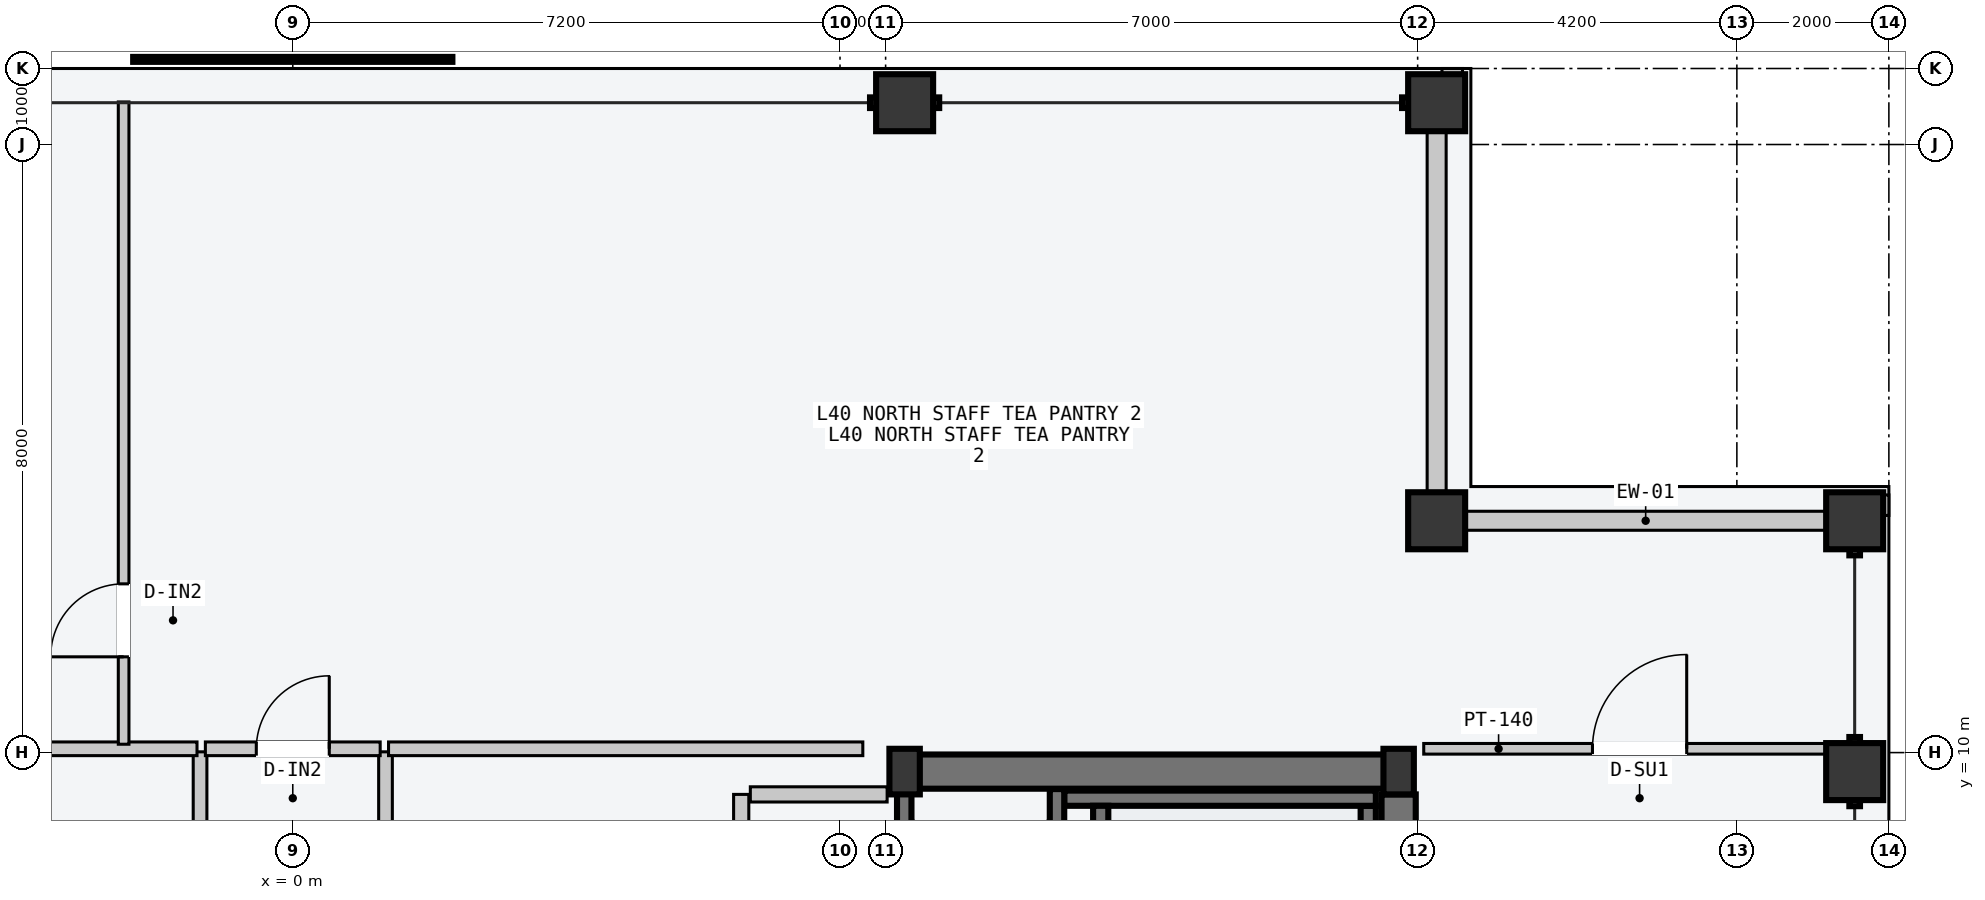
"""IFC4 building model, lengths in metres.
Left out: names, types, materials, properties, quantities, classifications, styles, units other than length and angle.
Written with IfcOpenShell. Run it as: python <this file> out.ifc"""

import sys

from ifc_helpers import new_model, si_unit, direction, frame, frame_2d, origin, origin_2d, place, context, subcontext, project, spatial, rectangle, hollow_rectangle, i_section, extrude, element, fill, save


model = new_model("IFC4")
c1 = context("Model", 3, precision=1e-05, world=origin(), true_north=direction((0.0, 1.0)))
c2 = subcontext(c1, "Body", "Model", "MODEL_VIEW")
j1 = project(units=[si_unit("LENGTHUNIT", "METRE"), si_unit("PLANEANGLEUNIT", "RADIAN")], contexts=[c1])
p1 = place(None, origin())
s1 = spatial("IfcSite", under=j1, at=p1, CompositionType="ELEMENT")
p2 = place(p1, origin())
s2 = spatial("IfcBuilding", under=s1, at=p2, CompositionType="ELEMENT")
p3 = place(p2, frame((0.0, 0.0, 155.1)))
s3 = spatial("IfcBuildingStorey", under=s2, at=p3, CompositionType="ELEMENT", Elevation=155.1)
p4 = place(p3, frame((8.07, 9.75, -0.2), z_axis=(0.0, 0.0, 1.0), x_axis=(1.0, 0.0, 0.0)))
e1 = element("IfcWall", 1, at=p4, inside=s3, PredefinedType="SHEAR", context=c2, shape_type="SweptSolid", body=[
    extrude(rectangle(XDim=6.46, YDim=0.45, at=frame_2d((3.23, 0.0))), origin(), (0.0, 0.0, 1.0), 3.6),
])
p5 = place(p3, frame((14.55, 0.3, -0.2), z_axis=(0.0, 0.0, 1.0), x_axis=(0.0, 1.0, 0.0)))
e2 = element("IfcWall", 2, at=p5, inside=s3, PredefinedType="SHEAR", context=c2, shape_type="SweptSolid", body=[
    extrude(rectangle(XDim=9.15, YDim=0.45, at=frame_2d((4.575, 0.0))), origin(), (0.0, 0.0, 1.0), 3.6),
])
p6 = place(p3, frame((14.15, 1.5, -0.2), z_axis=(0.0, 0.0, 1.0), x_axis=(0.0, 1.0, 0.0)))
e3 = element("IfcWall", 3, at=p6, inside=s3, PredefinedType="SOLIDWALL", context=c2, shape_type="SweptSolid", body=[
    extrude(rectangle(XDim=7.8, YDim=0.2, at=frame_2d((3.9, 0.0))), origin(), (0.0, 0.0, 1.0), 3.6),
])
p7 = place(p3, frame((10.15, 9.4, -0.2), z_axis=(0.0, 0.0, 1.0), x_axis=(1.0, 0.0, 0.0)))
e4 = element("IfcWall", 4, at=p7, inside=s3, PredefinedType="SOLIDWALL", context=c2, shape_type="SweptSolid", body=[
    extrude(rectangle(XDim=4.1, YDim=0.2, at=frame_2d((2.05, 0.0))), origin(), (0.0, 0.0, 1.0), 3.6),
])
p8 = place(p3, frame((10.63, 1.5, -0.2), z_axis=(0.0, 0.0, 1.0), x_axis=(0.0, 1.0, 0.0)))
e5 = element("IfcWall", 5, at=p8, inside=s3, PredefinedType="SOLIDWALL", context=c2, shape_type="SweptSolid", body=[
    extrude(rectangle(XDim=7.8, YDim=0.2, at=frame_2d((3.9, 0.0))), origin(), (0.0, 0.0, 1.0), 3.6),
])
for number, where, z_axis, x_axis in (
    (6, (8.05, 9.75, 0.0), (0.0, 0.0, 1.0), (1.0, 0.0, 0.0)),
    (7, (14.55, 9.75, 0.0), (0.0, 0.0, 1.0), (1.0, 0.0, 0.0)),
):
    element("IfcColumn", number, at=place(p3, frame(where, z_axis=z_axis, x_axis=x_axis)), inside=s3, PredefinedType="COLUMN", context=c2, shape_type="SweptSolid", body=[
        extrude(i_section(OverallWidth=0.4, OverallDepth=0.6, WebThickness=0.022, FlangeThickness=0.036, at=origin_2d()), origin(), (0.0, 0.0, 1.0), 3.6),
    ])
for number, where, z_axis, x_axis in (
    (8, (8.05, 18.55, 0.0), (0.0, 0.0, 1.0), (1.0, 0.0, 0.0)),
    (9, (15.05, 18.55, 0.0), (0.0, 0.0, 1.0), (1.0, 0.0, 0.0)),
    (10, (20.55, 9.75, 0.0), (0.0, 0.0, 1.0), (0.0, 1.0, 0.0)),
    (11, (20.55, 13.05, 0.0), (0.0, 0.0, 1.0), (0.0, 1.0, 0.0)),
    (12, (15.05, 13.05, 0.0), (0.0, 0.0, 1.0), (1.0, 0.0, 0.0)),
):
    element("IfcColumn", number, at=place(p3, frame(where, z_axis=z_axis, x_axis=x_axis)), inside=s3, PredefinedType="COLUMN", context=c2, shape_type="SweptSolid", body=[
        extrude(hollow_rectangle(XDim=0.75, YDim=0.75, WallThickness=0.032, at=origin_2d()), origin(), (0.0, 0.0, 1.0), 3.6),
    ])
for number, where, z_axis, x_axis in (
    (13, (15.435, 13.05, 0.0), (0.0, 0.0, 1.0), (1.0, 0.0, 0.0)),
    (14, (15.05, 13.435, 0.0), (0.0, 0.0, 1.0), (0.0, 1.0, 0.0)),
):
    element("IfcWall", number, at=place(p3, frame(where, z_axis=z_axis, x_axis=x_axis)), inside=s3, PredefinedType="STANDARD", context=c2, shape_type="SweptSolid", body=[
        extrude(rectangle(XDim=4.73, YDim=0.25, at=frame_2d((2.365, 0.0))), origin(), (0.0, 0.0, 1.0), 2.75),
    ])
for number, where, z_axis, x_axis in (
    (15, (15.12, 18.89, 0.0), (0.0, 0.0, 1.0), (1.0, 0.0, 0.0)),
    (16, (20.89, 13.12, 0.0), (0.0, 0.0, 1.0), (0.0, 1.0, 0.0)),
):
    element("IfcWall", number, at=place(p3, frame(where, z_axis=z_axis, x_axis=x_axis)), inside=s3, PredefinedType="PARAPET", context=c2, shape_type="SweptSolid", body=[
        extrude(rectangle(XDim=0.27, YDim=0.22, at=frame_2d((0.135, 0.0))), origin(), (0.0, 0.0, 1.0), 1.2),
    ])
for number, where, z_axis, x_axis in (
    (17, (8.045, 7.15, -0.2), (0.0, 0.0, 1.0), (0.0, 1.0, 0.0)),
    (18, (10.055, 7.15, -0.2), (0.0, 0.0, 1.0), (0.0, 1.0, 0.0)),
):
    element("IfcWall", number, at=place(p3, frame(where, z_axis=z_axis, x_axis=x_axis)), inside=s3, PredefinedType="SOLIDWALL", context=c2, shape_type="SweptSolid", body=[
        extrude(rectangle(XDim=2.37, YDim=0.19, at=frame_2d((1.185, 0.0))), origin(), (0.0, 0.0, 1.0), 3.6),
    ])
p9 = place(p3, frame((5.9, -9.45, 0.0), z_axis=(0.0, 0.0, 1.0), x_axis=(0.0, 1.0, 0.0)))
e19 = element("IfcWall", 19, at=p9, inside=s3, PredefinedType="PARTITIONING", context=c2, shape_type="SweptSolid", body=[
    extrude(rectangle(XDim=18.9, YDim=0.2, at=frame_2d((9.45, 0.0))), origin(), (0.0, 0.0, 1.0), 3.4),
])
p10 = place(p9, frame((3.9, 0.0, 0.0)))
e20 = element("IfcOpeningElement", 20, at=p10, cuts=e19, PredefinedType="OPENING", context=c2, shape_type="SweptSolid", body=[
    extrude(rectangle(XDim=1.5, YDim=2.2, at=frame_2d((0.75, 1.1))), frame((0.0, 0.11, 0.0), z_axis=(0.0, -1.0, 0.0), x_axis=(1.0, 0.0, 0.0)), (0.0, 0.0, 1.0), 0.22),
])
p11 = place(p3, frame((6.02, 9.45, 0.0), z_axis=(0.0, 0.0, 1.0), x_axis=(1.0, 0.0, 0.0)))
e21 = element("IfcWall", 21, at=p11, inside=s3, PredefinedType="PARTITIONING", context=c2, shape_type="SweptSolid", body=[
    extrude(rectangle(XDim=1.8, YDim=0.2, at=frame_2d((0.9, 0.0))), origin(), (0.0, 0.0, 1.0), 3.4),
])
p12 = place(p3, frame((-1.22, -3.5, 0.0), z_axis=(0.0, 0.0, 1.0), x_axis=(0.0, 1.0, 0.0)))
e22 = element("IfcWall", 22, at=p12, inside=s3, PredefinedType="PARTITIONING", context=c2, shape_type="SweptSolid", body=[
    extrude(rectangle(XDim=13.51, YDim=0.18, at=frame_2d((6.755, 0.0))), origin(), (0.0, 0.0, 1.0), 3.4),
])
p13 = place(p12, frame((6.1, 0.0, 0.0)))
e23 = element("IfcOpeningElement", 23, at=p13, cuts=e22, PredefinedType="OPENING", context=c2, shape_type="SweptSolid", body=[
    extrude(rectangle(XDim=1.24, YDim=2.24, at=frame_2d((0.62, 1.12))), frame((0.0, 0.1, 0.0), z_axis=(0.0, -1.0, 0.0), x_axis=(1.0, 0.0, 0.0)), (0.0, 0.0, 1.0), 0.2),
])
p14 = place(p12, frame((1.6, 0.0, 0.0)))
e24 = element("IfcOpeningElement", 24, at=p14, cuts=e22, PredefinedType="OPENING", context=c2, shape_type="SweptSolid", body=[
    extrude(rectangle(XDim=0.96, YDim=2.18, at=frame_2d((0.48, 1.09))), frame((0.0, 0.1, 0.0), z_axis=(0.0, -1.0, 0.0), x_axis=(1.0, 0.0, 0.0)), (0.0, 0.0, 1.0), 0.2),
])
p15 = place(p3, frame((-7.5, 10.05, 0.0), z_axis=(0.0, 0.0, 1.0), x_axis=(1.0, 0.0, 0.0)))
e25 = element("IfcWall", 25, at=p15, inside=s3, PredefinedType="PARTITIONING", context=c2, shape_type="SweptSolid", body=[
    extrude(rectangle(XDim=6.24, YDim=0.18, at=frame_2d((3.12, 0.0))), origin(), (0.0, 0.0, 1.0), 3.4),
])
p16 = place(p3, frame((1.22, -3.5, 0.0), z_axis=(0.0, 0.0, 1.0), x_axis=(0.0, 1.0, 0.0)))
e26 = element("IfcWall", 26, at=p16, inside=s3, PredefinedType="PARTITIONING", context=c2, shape_type="SweptSolid", body=[
    extrude(rectangle(XDim=13.51, YDim=0.18, at=frame_2d((6.755, 0.0))), origin(), (0.0, 0.0, 1.0), 3.4),
])
p17 = place(p16, frame((6.1, 0.0, 0.0)))
e27 = element("IfcOpeningElement", 27, at=p17, cuts=e26, PredefinedType="OPENING", context=c2, shape_type="SweptSolid", body=[
    extrude(rectangle(XDim=1.24, YDim=2.24, at=frame_2d((0.62, 1.12))), frame((0.0, 0.1, 0.0), z_axis=(0.0, -1.0, 0.0), x_axis=(1.0, 0.0, 0.0)), (0.0, 0.0, 1.0), 0.2),
])
p18 = place(p16, frame((1.6, 0.0, 0.0)))
e28 = element("IfcOpeningElement", 28, at=p18, cuts=e26, PredefinedType="OPENING", context=c2, shape_type="SweptSolid", body=[
    extrude(rectangle(XDim=0.96, YDim=2.18, at=frame_2d((0.48, 1.09))), frame((0.0, 0.1, 0.0), z_axis=(0.0, -1.0, 0.0), x_axis=(1.0, 0.0, 0.0)), (0.0, 0.0, 1.0), 0.2),
])
p19 = place(p3, frame((1.26, 10.05, 0.0), z_axis=(0.0, 0.0, 1.0), x_axis=(1.0, 0.0, 0.0)))
e29 = element("IfcWall", 29, at=p19, inside=s3, PredefinedType="PARTITIONING", context=c2, shape_type="SweptSolid", body=[
    extrude(rectangle(XDim=6.24, YDim=0.18, at=frame_2d((3.12, 0.0))), origin(), (0.0, 0.0, 1.0), 3.4),
])
p20 = place(p3, frame((-2.226, 10.11, 0.0), z_axis=(0.0, 0.0, 1.0), x_axis=(0.0, 1.0, 0.0)))
e30 = element("IfcWall", 30, at=p20, inside=s3, PredefinedType="PARTITIONING", context=c2, shape_type="SweptSolid", body=[
    extrude(rectangle(XDim=8.45, YDim=0.14, at=frame_2d((4.225, 0.0))), origin(), (0.0, 0.0, 1.0), 3.4),
])
p21 = place(p20, frame((1.15, 0.0, 0.0)))
e31 = element("IfcOpeningElement", 31, at=p21, cuts=e30, PredefinedType="OPENING", context=c2, shape_type="SweptSolid", body=[
    extrude(rectangle(XDim=0.96, YDim=2.18, at=frame_2d((0.48, 1.09))), frame((0.0, 0.08, 0.0), z_axis=(0.0, -1.0, 0.0), x_axis=(1.0, 0.0, 0.0)), (0.0, 0.0, 1.0), 0.16),
])
p22 = place(p3, frame((-1.15, 10.05, 0.0), z_axis=(0.0, 0.0, 1.0), x_axis=(1.0, 0.0, 0.0)))
e32 = element("IfcWall", 32, at=p22, inside=s3, PredefinedType="PARTITIONING", context=c2, shape_type="SweptSolid", body=[
    extrude(rectangle(XDim=2.3, YDim=0.18, at=frame_2d((1.15, 0.0))), origin(), (0.0, 0.0, 1.0), 3.4),
])
p23 = place(p22, frame((0.67, 0.0, 0.0)))
e33 = element("IfcOpeningElement", 33, at=p23, cuts=e32, PredefinedType="OPENING", context=c2, shape_type="SweptSolid", body=[
    extrude(rectangle(XDim=0.96, YDim=2.18, at=frame_2d((0.48, 1.09))), frame((0.0, 0.1, 0.0), z_axis=(0.0, -1.0, 0.0), x_axis=(1.0, 0.0, 0.0)), (0.0, 0.0, 1.0), 0.2),
])
p24 = place(p3, frame((14.88, 10.05, 0.0), z_axis=(0.0, 0.0, 1.0), x_axis=(1.0, 0.0, 0.0)))
e34 = element("IfcWall", 34, at=p24, inside=s3, PredefinedType="PARTITIONING", context=c2, shape_type="SweptSolid", body=[
    extrude(rectangle(XDim=5.68, YDim=0.14, at=frame_2d((2.84, 0.0))), origin(), (0.0, 0.0, 1.0), 3.4),
])
p25 = place(p24, frame((2.22, 0.0, 0.0)))
e35 = element("IfcOpeningElement", 35, at=p25, cuts=e34, PredefinedType="OPENING", context=c2, shape_type="SweptSolid", body=[
    extrude(rectangle(XDim=1.24, YDim=2.24, at=frame_2d((0.62, 1.12))), frame((0.0, 0.08, 0.0), z_axis=(0.0, -1.0, 0.0), x_axis=(1.0, 0.0, 0.0)), (0.0, 0.0, 1.0), 0.16),
])
p26 = place(p21, origin())
e36 = element("IfcDoor", 36, at=p26, inside=s3, OperationType="SINGLE_SWING_LEFT", PredefinedType="DOOR", context=c2, shape_type="SweptSolid", body=[
    extrude(rectangle(XDim=0.96, YDim=2.18, at=frame_2d((0.48, 1.09))), frame((0.0, 0.025, 0.0), z_axis=(0.0, -1.0, 0.0), x_axis=(1.0, 0.0, 0.0)), (0.0, 0.0, 1.0), 0.05),
])
fill(e31, e36)
p27 = place(p23, origin())
e37 = element("IfcDoor", 37, at=p27, inside=s3, OperationType="SINGLE_SWING_RIGHT", PredefinedType="DOOR", context=c2, shape_type="SweptSolid", body=[
    extrude(rectangle(XDim=0.96, YDim=2.18, at=frame_2d((0.48, 1.09))), frame((0.0, 0.025, 0.0), z_axis=(0.0, -1.0, 0.0), x_axis=(1.0, 0.0, 0.0)), (0.0, 0.0, 1.0), 0.05),
])
fill(e33, e37)
p28 = place(p25, origin())
e38 = element("IfcDoor", 38, at=p28, inside=s3, OperationType="SINGLE_SWING_RIGHT", PredefinedType="DOOR", context=c2, shape_type="SweptSolid", body=[
    extrude(rectangle(XDim=1.24, YDim=2.24, at=frame_2d((0.62, 1.12))), frame((0.0, 0.025, 0.0), z_axis=(0.0, -1.0, 0.0), x_axis=(1.0, 0.0, 0.0)), (0.0, 0.0, 1.0), 0.05),
])
fill(e35, e38)
save(model, sys.argv[1])
